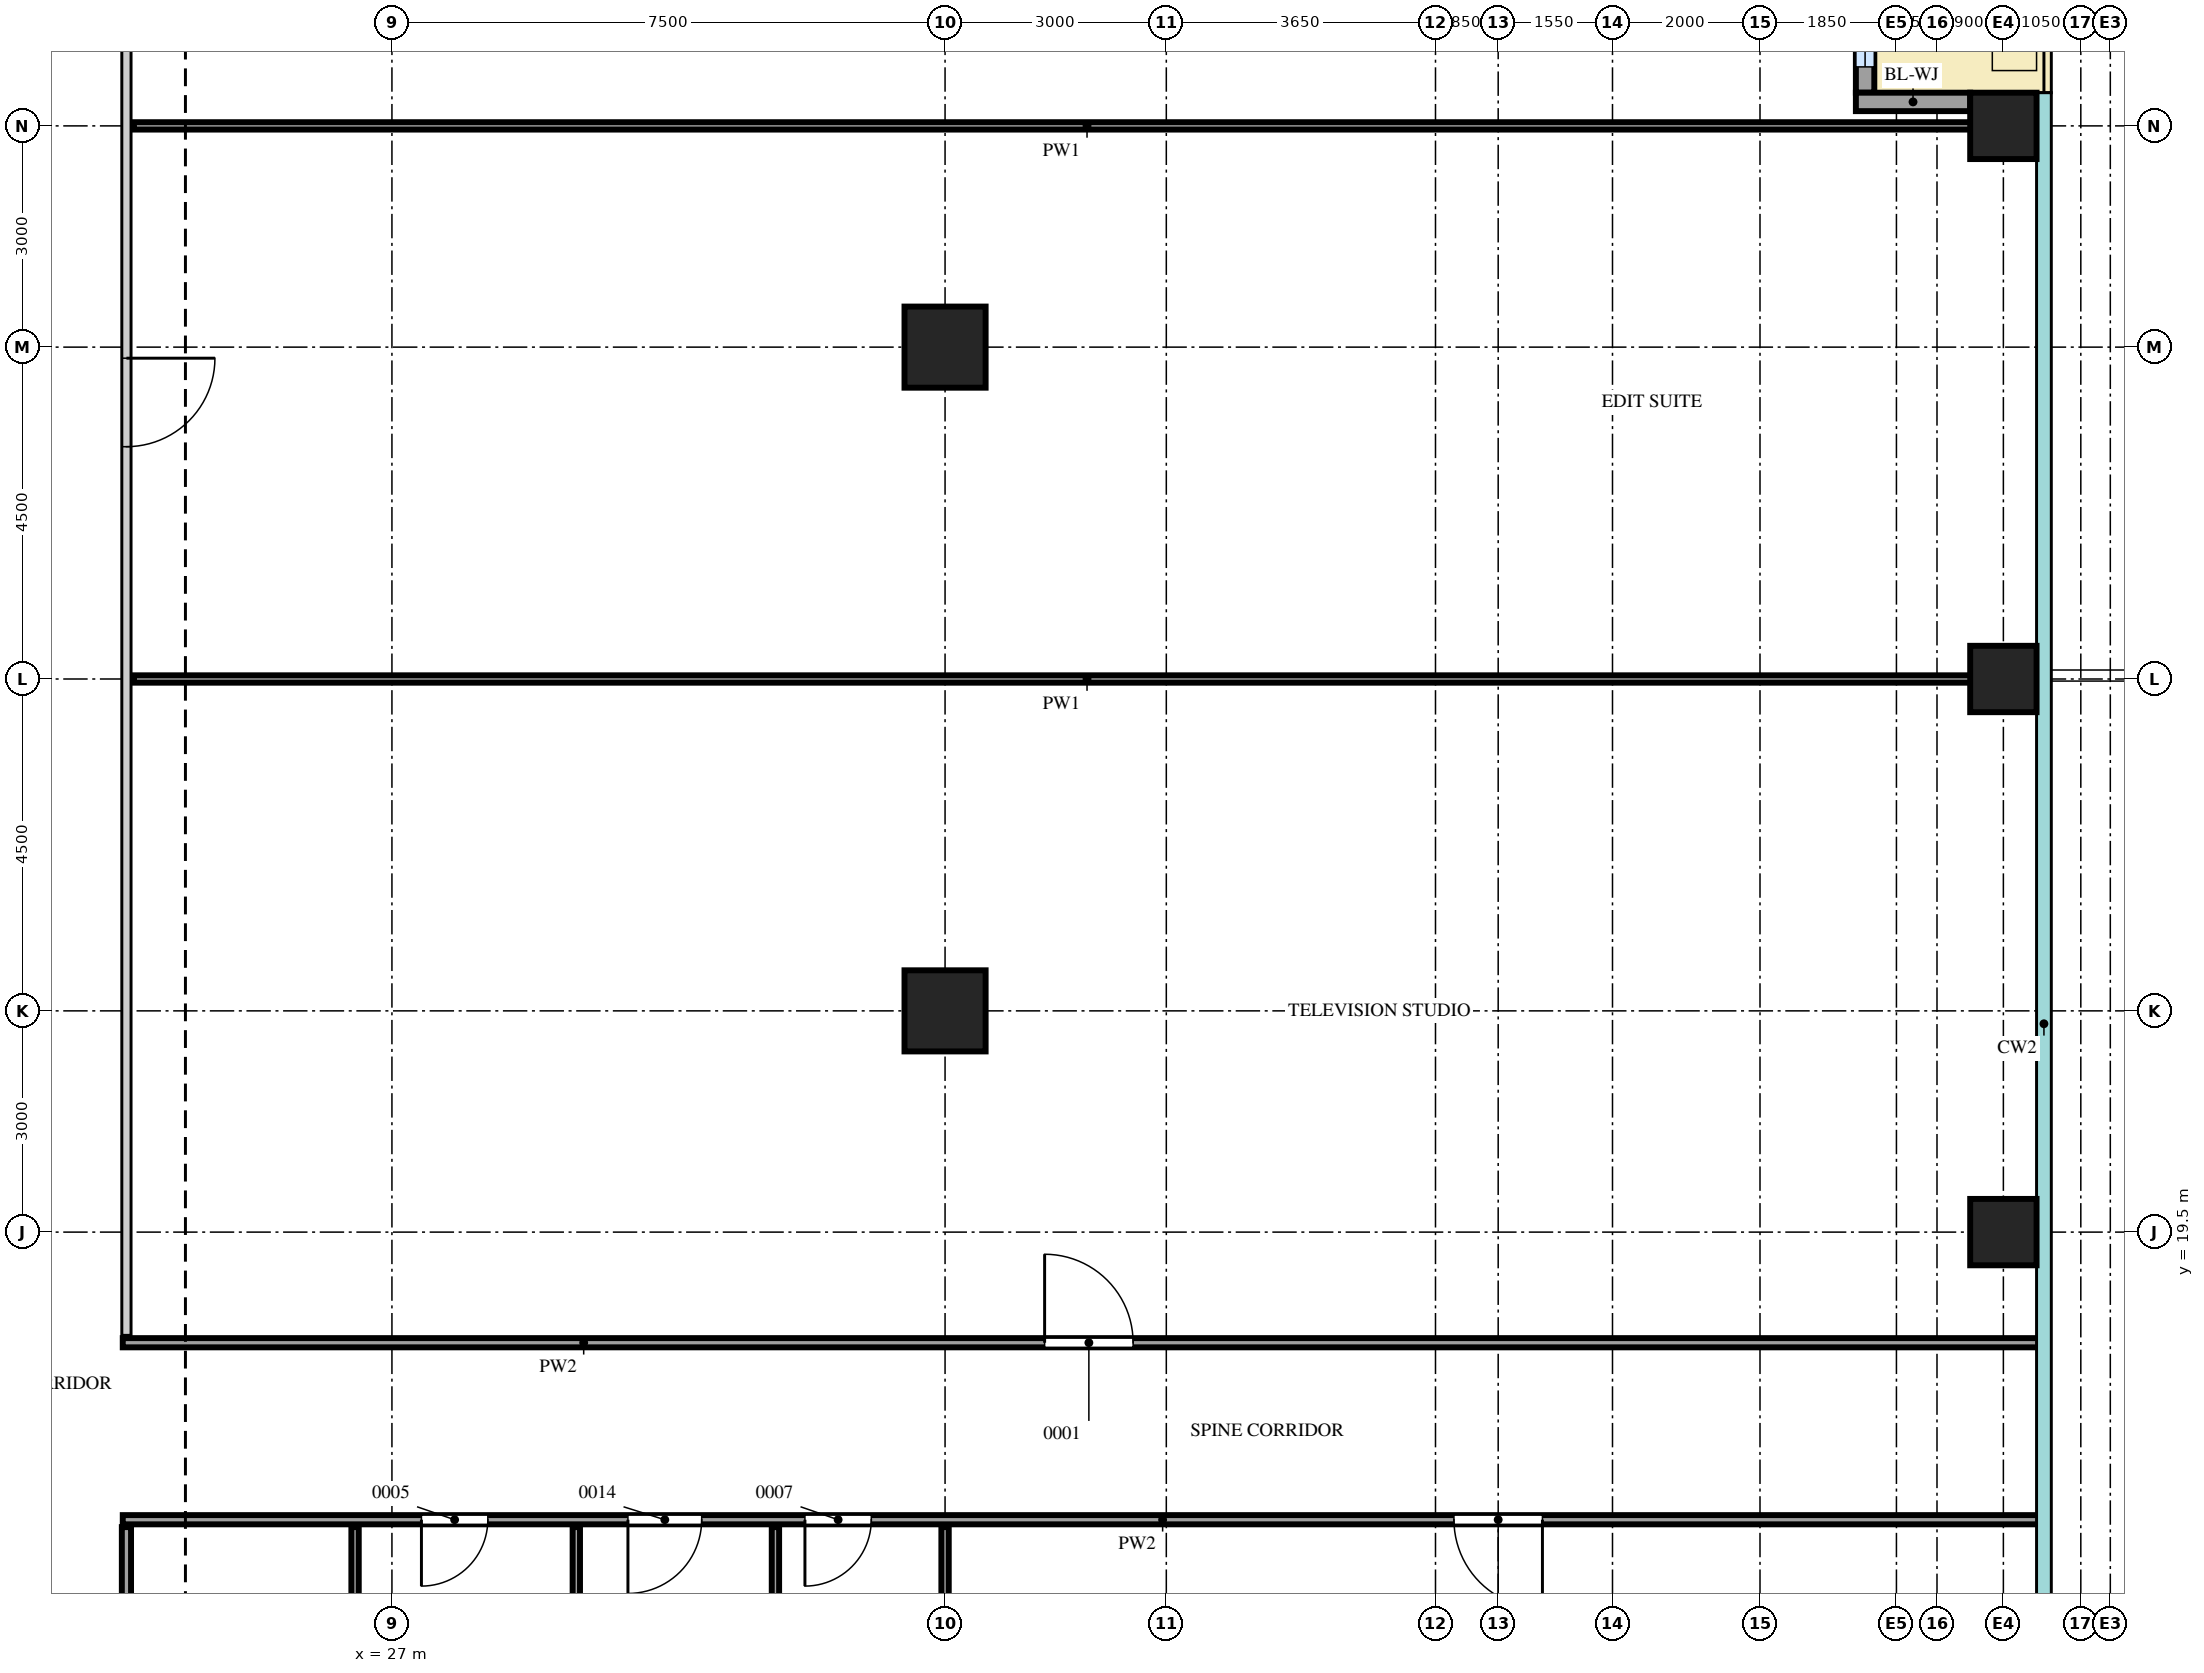
"""IFC4 building model, lengths in metres.
Left out: names, types, materials, properties, quantities, classifications, styles, units other than length and angle.
Written with IfcOpenShell. Run it as: python <this file> out.ifc"""

import sys

from ifc_helpers import new_model, si_unit, direction, frame, frame_2d, origin, origin_2d, place, context, subcontext, project, spatial, rectangle, extrude, source, transform, mapped, element, fill, save


model = new_model("IFC4")
c1 = context("Model", 3, precision=1e-05, world=origin(), true_north=direction((0.0, 1.0)))
c2 = subcontext(c1, "Body", "Model", "MODEL_VIEW")
j1 = project(units=[si_unit("LENGTHUNIT", "METRE"), si_unit("PLANEANGLEUNIT", "RADIAN")], contexts=[c1])
p1 = place(None, origin())
s1 = spatial("IfcSite", under=j1, at=p1, CompositionType="ELEMENT")
p2 = place(p1, origin())
s2 = spatial("IfcBuilding", under=s1, at=p2, CompositionType="ELEMENT")
p3 = place(p2, frame((0.0, 0.0, 250.2)))
s3 = spatial("IfcBuildingStorey", under=s2, at=p3, CompositionType="ELEMENT", Elevation=250.2)
m1 = source(origin(), c2, "Body", "SweptSolid", [
    extrude(rectangle(XDim=0.9, YDim=0.9, at=origin_2d()), origin(), (0.0, 0.0, 1.0), 3.75),
])
for number, where, z_axis, x_axis in (
    (1, (48.85, 19.5, 0.0), (0.0, 0.0, 1.0), (1.0, 0.0, 0.0)),
    (2, (48.85, 27.0, 0.0), (0.0, 0.0, 1.0), (1.0, 0.0, 0.0)),
    (3, (48.85, 34.5, 0.0), (0.0, 0.0, 1.0), (1.0, 0.0, 0.0)),
):
    element("IfcColumn", number, at=place(p3, frame(where, z_axis=z_axis, x_axis=x_axis)), inside=s3, PredefinedType="COLUMN", context=c2, shape_type="MappedRepresentation", body=[
        mapped(m1, transform((0.0, 0.0, 0.0))),
    ])
m2 = source(origin(), c2, "Body", "SweptSolid", [
    extrude(rectangle(XDim=1.1, YDim=1.1, at=origin_2d()), origin(), (0.0, 0.0, 1.0), 3.75),
])
for number, where, z_axis, x_axis in (
    (4, (34.5, 22.5, 0.0), (0.0, 0.0, 1.0), (1.0, 0.0, 0.0)),
    (5, (34.5, 31.5, 0.0), (0.0, 0.0, 1.0), (1.0, 0.0, 0.0)),
):
    element("IfcColumn", number, at=place(p3, frame(where, z_axis=z_axis, x_axis=x_axis)), inside=s3, PredefinedType="COLUMN", context=c2, shape_type="MappedRepresentation", body=[
        mapped(m2, transform((0.0, 0.0, 0.0))),
    ])
m3 = source(origin(), c2, "Body", "SweptSolid", [
    extrude(rectangle(XDim=8.15, YDim=0.25, at=frame_2d((4.075, 0.0))), origin(), (0.0, 0.0, 1.0), 3.2),
])
p4 = place(p3, frame((46.975, 34.95, 0.0), z_axis=(0.0, 0.0, 1.0), x_axis=(0.0, 1.0, 0.0)))
e6 = element("IfcWall", 6, at=p4, inside=s3, PredefinedType="SOLIDWALL", context=c2, shape_type="MappedRepresentation", body=[
    mapped(m3, transform((0.0, 0.0, 0.0))),
])
m4 = source(origin(), c2, "Body", "SweptSolid", [
    extrude(rectangle(XDim=2.5, YDim=2.4, at=frame_2d((1.25, 1.2))), frame((0.0, 0.135, 0.0), z_axis=(0.0, -1.0, 0.0), x_axis=(1.0, 0.0, 0.0)), (0.0, 0.0, 1.0), 0.27),
])
p5 = place(p4, frame((0.35, 0.0, 0.0)))
e7 = element("IfcOpeningElement", 7, at=p5, cuts=e6, PredefinedType="OPENING", context=c2, shape_type="MappedRepresentation", body=[
    mapped(m4, transform((0.0, 0.0, 0.0))),
])
p6 = place(p4, frame((5.25, 0.0, 0.0)))
e8 = element("IfcOpeningElement", 8, at=p6, cuts=e6, PredefinedType="OPENING", context=c2, shape_type="MappedRepresentation", body=[
    mapped(m4, transform((0.0, 0.0, 0.0))),
])
m5 = source(origin(), c2, "Body", "SweptSolid", [
    extrude(rectangle(XDim=1.8, YDim=2.4, at=frame_2d((0.9, 1.2))), frame((0.0, 0.135, 0.0), z_axis=(0.0, -1.0, 0.0), x_axis=(1.0, 0.0, 0.0)), (0.0, 0.0, 1.0), 0.27),
])
p7 = place(p4, frame((3.15, 0.0, 0.0)))
e9 = element("IfcOpeningElement", 9, at=p7, cuts=e6, PredefinedType="OPENING", context=c2, shape_type="MappedRepresentation", body=[
    mapped(m5, transform((0.0, 0.0, 0.0))),
])
m6 = source(origin(), c2, "Body", "SweptSolid", [
    extrude(rectangle(XDim=1.55, YDim=0.25, at=frame_2d((0.775, 0.0))), origin(), (0.0, 0.0, 1.0), 3.2),
])
p8 = place(p3, frame((48.4, 34.825, 0.0), z_axis=(0.0, 0.0, 1.0), x_axis=(-1.0, 0.0, 0.0)))
e10 = element("IfcWall", 10, at=p8, inside=s3, PredefinedType="SOLIDWALL", context=c2, shape_type="MappedRepresentation", body=[
    mapped(m6, transform((0.0, 0.0, 0.0))),
])
m7 = source(origin(), c2, "Body", "SweptSolid", [
    extrude(rectangle(XDim=10.85, YDim=0.125, at=frame_2d((5.425, 0.0))), origin(), (0.0, 0.0, 1.0), 3.8),
])
p9 = place(p3, frame((23.4, 4.65, 0.0), z_axis=(0.0, 0.0, 1.0), x_axis=(0.0, 1.0, 0.0)))
e11 = element("IfcWall", 11, at=p9, inside=s3, PredefinedType="PARTITIONING", context=c2, shape_type="MappedRepresentation", body=[
    mapped(m7, transform((0.0, 0.0, 0.0))),
])
m8 = source(origin(), c2, "Body", "SweptSolid", [
    extrude(rectangle(XDim=0.9, YDim=2.1, at=frame_2d((0.45, 1.05))), frame((0.0, 0.073, 0.0), z_axis=(0.0, -1.0, 0.0), x_axis=(1.0, 0.0, 0.0)), (0.0, 0.0, 1.0), 0.145),
])
p10 = place(p9, frame((4.5, 0.0, 0.0)))
e12 = element("IfcOpeningElement", 12, at=p10, cuts=e11, PredefinedType="OPENING", context=c2, shape_type="MappedRepresentation", body=[
    mapped(m8, transform((0.0, 0.0, 0.0))),
])
m9 = source(origin(), c2, "Body", "SweptSolid", [
    extrude(rectangle(XDim=10.85, YDim=0.1, at=frame_2d((5.425, 0.0))), origin(), (0.0, 0.0, 1.0), 3.8),
])
for number, where, z_axis, x_axis in (
    (13, (26.5, 4.65, 0.0), (0.0, 0.0, 1.0), (0.0, 1.0, 0.0)),
    (14, (29.5, 4.65, 0.0), (0.0, 0.0, 1.0), (0.0, 1.0, 0.0)),
    (15, (32.2, 4.65, 0.0), (0.0, 0.0, 1.0), (0.0, 1.0, 0.0)),
):
    element("IfcWall", number, at=place(p3, frame(where, z_axis=z_axis, x_axis=x_axis)), inside=s3, PredefinedType="PARTITIONING", context=c2, shape_type="MappedRepresentation", body=[
        mapped(m9, transform((0.0, 0.0, 0.0))),
    ])
m10 = source(origin(), c2, "Body", "SweptSolid", [
    extrude(rectangle(XDim=10.85, YDim=0.1, at=frame_2d((5.425, 0.0))), origin(), (0.0, 0.0, 1.0), 3.35),
])
p11 = place(p3, frame((34.5, 4.65, 0.0), z_axis=(0.0, 0.0, 1.0), x_axis=(0.0, 1.0, 0.0)))
e16 = element("IfcWall", 16, at=p11, inside=s3, PredefinedType="PARTITIONING", context=c2, shape_type="MappedRepresentation", body=[
    mapped(m10, transform((0.0, 0.0, 0.0))),
])
m11 = source(origin(), c2, "Body", "SweptSolid", [
    extrude(rectangle(XDim=26.0, YDim=0.125, at=frame_2d((13.0, 0.0))), origin(), (0.0, 0.0, 1.0), 3.8),
])
p12 = place(p3, frame((23.35, 15.6, 0.0), z_axis=(0.0, 0.0, 1.0), x_axis=(1.0, 0.0, 0.0)))
e17 = element("IfcWall", 17, at=p12, inside=s3, PredefinedType="PARTITIONING", context=c2, shape_type="MappedRepresentation", body=[
    mapped(m11, transform((0.0, 0.0, 0.0))),
])
p13 = place(p12, frame((4.05, 0.0, 0.0)))
e18 = element("IfcOpeningElement", 18, at=p13, cuts=e17, PredefinedType="OPENING", context=c2, shape_type="MappedRepresentation", body=[
    mapped(m8, transform((0.0, 0.0, 0.0))),
])
m12 = source(origin(), c2, "Body", "SweptSolid", [
    extrude(rectangle(XDim=1.0, YDim=2.1, at=frame_2d((0.5, 1.05))), frame((0.0, 0.073, 0.0), z_axis=(0.0, -1.0, 0.0), x_axis=(1.0, 0.0, 0.0)), (0.0, 0.0, 1.0), 0.145),
])
p14 = place(p12, frame((6.85, 0.0, 0.0)))
e19 = element("IfcOpeningElement", 19, at=p14, cuts=e17, PredefinedType="OPENING", context=c2, shape_type="MappedRepresentation", body=[
    mapped(m12, transform((0.0, 0.0, 0.0))),
])
p15 = place(p12, frame((9.25, 0.0, 0.0)))
e20 = element("IfcOpeningElement", 20, at=p15, cuts=e17, PredefinedType="OPENING", context=c2, shape_type="MappedRepresentation", body=[
    mapped(m8, transform((0.0, 0.0, 0.0))),
])
m13 = source(origin(), c2, "Body", "SweptSolid", [
    extrude(rectangle(XDim=1.2, YDim=2.1, at=frame_2d((0.6, 1.05))), frame((0.0, 0.073, 0.0), z_axis=(0.0, -1.0, 0.0), x_axis=(1.0, 0.0, 0.0)), (0.0, 0.0, 1.0), 0.145),
])
p16 = place(p12, frame((18.05, 0.0, 0.0)))
e21 = element("IfcOpeningElement", 21, at=p16, cuts=e17, PredefinedType="OPENING", context=c2, shape_type="MappedRepresentation", body=[
    mapped(m13, transform((0.0, 0.0, 0.0))),
])
p17 = place(p3, frame((23.35, 18.0, 0.0), z_axis=(0.0, 0.0, 1.0), x_axis=(1.0, 0.0, 0.0)))
e22 = element("IfcWall", 22, at=p17, inside=s3, PredefinedType="PARTITIONING", context=c2, shape_type="MappedRepresentation", body=[
    mapped(m11, transform((0.0, 0.0, 0.0))),
])
p18 = place(p17, frame((12.5, 0.0, 0.0)))
e23 = element("IfcOpeningElement", 23, at=p18, cuts=e22, PredefinedType="OPENING", context=c2, shape_type="MappedRepresentation", body=[
    mapped(m13, transform((0.0, 0.0, 0.0))),
])
m14 = source(origin(), c2, "Body", "SweptSolid", [
    extrude(rectangle(XDim=20.8, YDim=0.125, at=frame_2d((10.4, 0.0))), origin(), (0.0, 0.0, 1.0), 3.8),
])
p19 = place(p3, frame((23.4, 18.1, 0.0), z_axis=(0.0, 0.0, 1.0), x_axis=(0.0, 1.0, 0.0)))
e24 = element("IfcWall", 24, at=p19, inside=s3, PredefinedType="PARTITIONING", context=c2, shape_type="MappedRepresentation", body=[
    mapped(m14, transform((0.0, 0.0, 0.0))),
])
p20 = place(p19, frame((12.05, 0.0, 0.0)))
e25 = element("IfcOpeningElement", 25, at=p20, cuts=e24, PredefinedType="OPENING", context=c2, shape_type="MappedRepresentation", body=[
    mapped(m13, transform((0.0, 0.0, 0.0))),
])
m15 = source(origin(), c2, "Body", "SweptSolid", [
    extrude(rectangle(XDim=25.85, YDim=0.1, at=frame_2d((12.925, 0.0))), origin(), (0.0, 0.0, 1.0), 3.8),
])
for number, where, z_axis, x_axis in (
    (26, (23.5, 27.0, 0.0), (0.0, 0.0, 1.0), (1.0, 0.0, 0.0)),
    (27, (23.5, 34.5, 0.0), (0.0, 0.0, 1.0), (1.0, 0.0, 0.0)),
):
    element("IfcWall", number, at=place(p3, frame(where, z_axis=z_axis, x_axis=x_axis)), inside=s3, PredefinedType="PARTITIONING", context=c2, shape_type="MappedRepresentation", body=[
        mapped(m15, transform((0.0, 0.0, 0.0))),
    ])
m16 = source(origin(), c2, "Body", "SweptSolid", [
    extrude(rectangle(XDim=2.5, YDim=2.4, at=frame_2d((1.25, 1.2))), frame((0.0, 0.03, 0.0), z_axis=(0.0, -1.0, 0.0), x_axis=(1.0, 0.0, 0.0)), (0.0, 0.0, 1.0), 0.06),
])
p21 = place(p5, origin())
e28 = element("IfcWindow", 28, at=p21, inside=s3, PartitioningType="SINGLE_PANEL", PredefinedType="WINDOW", context=c2, shape_type="MappedRepresentation", body=[
    mapped(m16, transform((0.0, 0.0, 0.0))),
])
fill(e7, e28)
m17 = source(origin(), c2, "Body", "SweptSolid", [
    extrude(rectangle(XDim=0.9, YDim=2.1, at=frame_2d((0.45, 1.05))), frame((0.0, 0.025, 0.0), z_axis=(0.0, -1.0, 0.0), x_axis=(1.0, 0.0, 0.0)), (0.0, 0.0, 1.0), 0.05),
])
p22 = place(p13, origin())
e29 = element("IfcDoor", 29, at=p22, inside=s3, OperationType="SINGLE_SWING_LEFT", PredefinedType="DOOR", context=c2, shape_type="MappedRepresentation", body=[
    mapped(m17, transform((0.0, 0.0, 0.0))),
])
fill(e18, e29)
m18 = source(origin(), c2, "Body", "SweptSolid", [
    extrude(rectangle(XDim=1.0, YDim=2.1, at=frame_2d((0.5, 1.05))), frame((0.0, 0.025, 0.0), z_axis=(0.0, -1.0, 0.0), x_axis=(1.0, 0.0, 0.0)), (0.0, 0.0, 1.0), 0.05),
])
p23 = place(p14, origin())
e30 = element("IfcDoor", 30, at=p23, inside=s3, OperationType="SINGLE_SWING_LEFT", PredefinedType="DOOR", context=c2, shape_type="MappedRepresentation", body=[
    mapped(m18, transform((0.0, 0.0, 0.0))),
])
fill(e19, e30)
p24 = place(p15, origin())
e31 = element("IfcDoor", 31, at=p24, inside=s3, OperationType="SINGLE_SWING_LEFT", PredefinedType="DOOR", context=c2, shape_type="MappedRepresentation", body=[
    mapped(m17, transform((0.0, 0.0, 0.0))),
])
fill(e20, e31)
m19 = source(origin(), c2, "Body", "SweptSolid", [
    extrude(rectangle(XDim=1.2, YDim=2.1, at=frame_2d((0.6, 1.05))), frame((0.0, 0.025, 0.0), z_axis=(0.0, -1.0, 0.0), x_axis=(1.0, 0.0, 0.0)), (0.0, 0.0, 1.0), 0.05),
])
p25 = place(p16, origin())
e32 = element("IfcDoor", 32, at=p25, inside=s3, OperationType="SINGLE_SWING_RIGHT", PredefinedType="DOOR", context=c2, shape_type="MappedRepresentation", body=[
    mapped(m19, transform((0.0, 0.0, 0.0))),
])
fill(e21, e32)
p26 = place(p18, origin())
e33 = element("IfcDoor", 33, at=p26, inside=s3, OperationType="SINGLE_SWING_RIGHT", PredefinedType="DOOR", context=c2, shape_type="MappedRepresentation", body=[
    mapped(m19, transform((0.0, 0.0, 0.0))),
])
fill(e23, e33)
p27 = place(p20, origin())
e34 = element("IfcDoor", 34, at=p27, inside=s3, OperationType="SINGLE_SWING_RIGHT", PredefinedType="DOOR", context=c2, shape_type="MappedRepresentation", body=[
    mapped(m19, transform((0.0, 0.0, 0.0))),
])
fill(e25, e34)
save(model, sys.argv[1])
